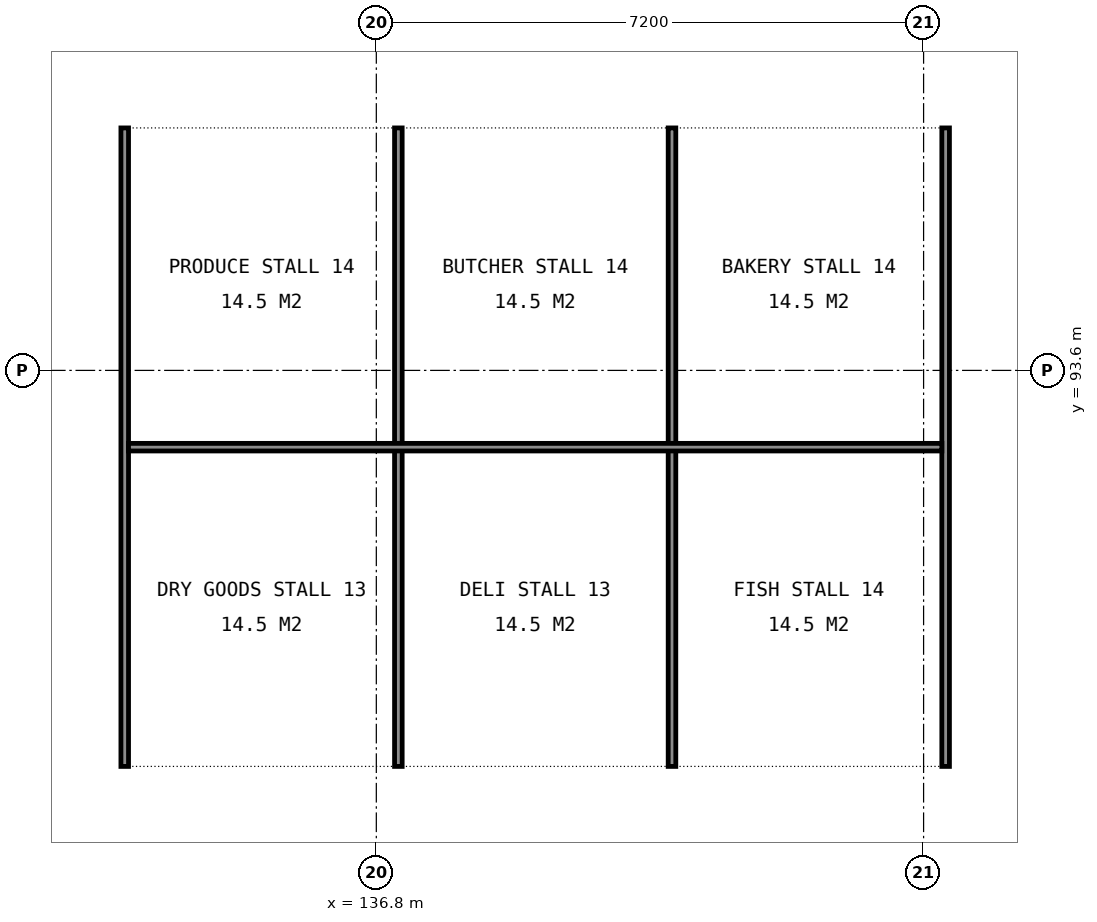
"""IFC4 building model, lengths in metres.
Left out: names, types, materials, properties, quantities, classifications, styles, units other than length and angle.
Written with IfcOpenShell. Run it as: python <this file> out.ifc"""

import sys

from ifc_helpers import new_model, si_unit, direction, frame, frame_2d, origin, place, context, subcontext, project, spatial, rectangle, extrude, element, save


model = new_model("IFC4")
c1 = context("Model", 3, precision=1e-05, world=origin(), true_north=direction((0.0, 1.0)))
c2 = subcontext(c1, "Body", "Model", "MODEL_VIEW")
j1 = project(units=[si_unit("LENGTHUNIT", "METRE"), si_unit("PLANEANGLEUNIT", "RADIAN")], contexts=[c1])
p1 = place(None, origin())
s1 = spatial("IfcSite", under=j1, at=p1, CompositionType="ELEMENT")
p2 = place(p1, origin())
s2 = spatial("IfcBuilding", under=s1, at=p2, CompositionType="ELEMENT")
p3 = place(p2, origin())
s3 = spatial("IfcBuildingStorey", under=s2, at=p3, CompositionType="ELEMENT", Elevation=0.0)
for number, where, z_axis, x_axis in (
    (1, (133.49, 88.39, 0.0), (0.0, 0.0, 1.0), (0.0, 1.0, 0.0)),
    (2, (137.09, 88.39, 0.0), (0.0, 0.0, 1.0), (0.0, 1.0, 0.0)),
    (3, (140.69, 88.39, 0.0), (0.0, 0.0, 1.0), (0.0, 1.0, 0.0)),
    (4, (144.29, 88.39, 0.0), (0.0, 0.0, 1.0), (0.0, 1.0, 0.0)),
):
    element("IfcWall", number, at=place(p3, frame(where, z_axis=z_axis, x_axis=x_axis)), inside=s3, PredefinedType="PARTITIONING", context=c2, shape_type="SweptSolid", body=[
        extrude(rectangle(XDim=8.4, YDim=0.1, at=frame_2d((4.2, 0.0))), origin(), (0.0, 0.0, 1.0), 1.2),
    ])
p4 = place(p3, frame((133.54, 92.59, 0.0), z_axis=(0.0, 0.0, 1.0), x_axis=(1.0, 0.0, 0.0)))
e5 = element("IfcWall", 5, at=p4, inside=s3, PredefinedType="PARTITIONING", context=c2, shape_type="SweptSolid", body=[
    extrude(rectangle(XDim=10.7, YDim=0.1, at=frame_2d((5.35, 0.0))), origin(), (0.0, 0.0, 1.0), 1.2),
])
save(model, sys.argv[1])
